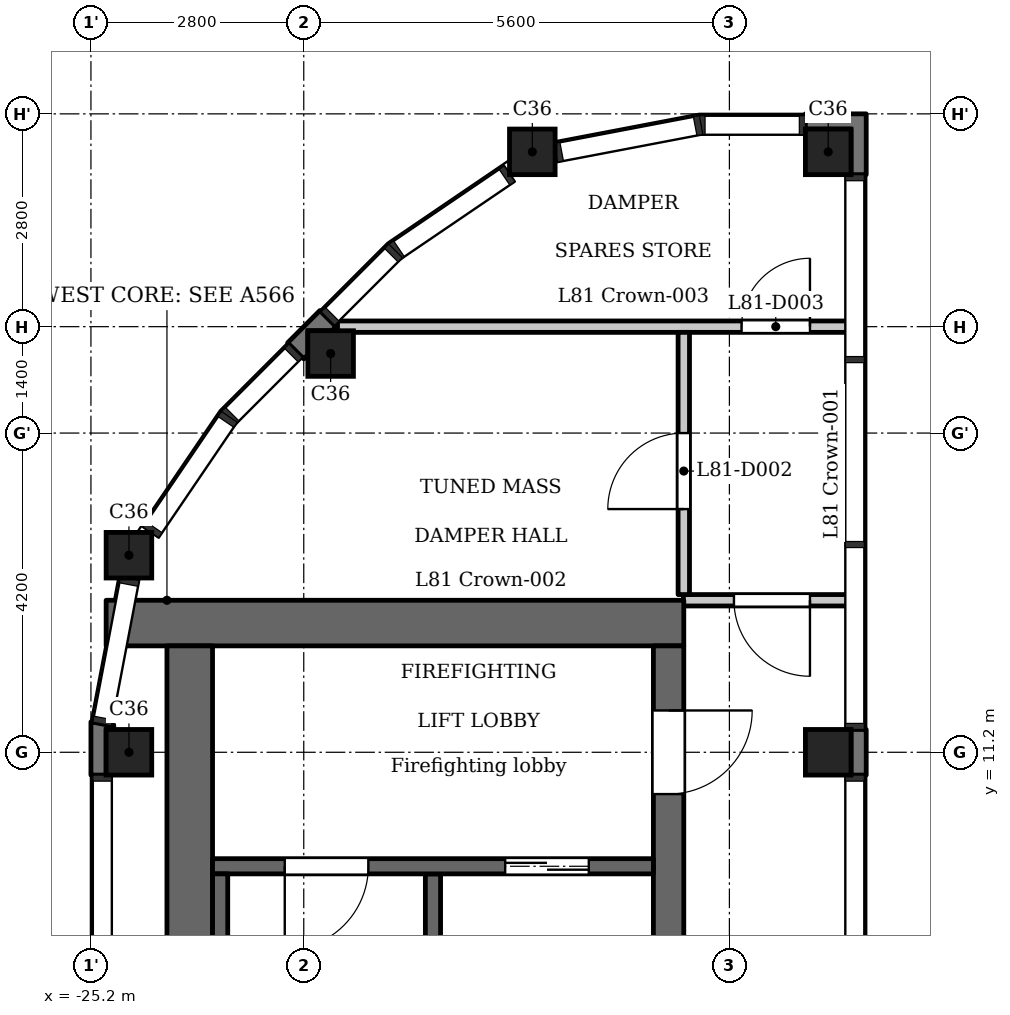
"""IFC4 building model, lengths in metres.
Left out: names, types, materials, properties, quantities, classifications, styles, units other than length and angle.
Written with IfcOpenShell. Run it as: python <this file> out.ifc"""

import sys

from ifc_helpers import new_model, si_unit, direction, frame, frame_2d, origin, origin_2d, place, context, subcontext, project, spatial, polyline, rectangle, outline, extrude, element, fill, save


model = new_model("IFC4")
c1 = context("Model", 3, precision=1e-05, world=origin(), true_north=direction((0.0, 1.0)))
c2 = subcontext(c1, "Body", "Model", "MODEL_VIEW")
j1 = project(units=[si_unit("LENGTHUNIT", "METRE"), si_unit("PLANEANGLEUNIT", "RADIAN")], contexts=[c1])
p1 = place(None, origin())
s1 = spatial("IfcSite", under=j1, at=p1, CompositionType="ELEMENT")
p2 = place(p1, origin())
s2 = spatial("IfcBuilding", under=s1, at=p2, CompositionType="ELEMENT")
p3 = place(p2, frame((0.0, 0.0, 313.9)))
s3 = spatial("IfcBuildingStorey", under=s2, at=p3, CompositionType="ELEMENT", Elevation=313.9)
for number, where, z_axis, x_axis in (
    (1, (-24.7, 11.2, 0.0), (0.0, 0.0, 1.0), (1.0, 0.0, 0.0)),
    (2, (-24.7, 13.793, 0.0), (0.0, 0.0, 1.0), (1.0, 0.0, 0.0)),
    (3, (-22.046, 16.446, 0.0), (0.0, 0.0, 1.0), (1.0, 0.0, 0.0)),
    (4, (-19.393, 19.1, 0.0), (0.0, 0.0, 1.0), (1.0, 0.0, 0.0)),
    (5, (-15.5, 11.2, 0.0), (0.0, 0.0, 1.0), (1.0, 0.0, 0.0)),
    (6, (-15.5, 19.1, 0.0), (0.0, 0.0, 1.0), (1.0, 0.0, 0.0)),
):
    element("IfcColumn", number, at=place(p3, frame(where, z_axis=z_axis, x_axis=x_axis)), inside=s3, PredefinedType="COLUMN", context=c2, shape_type="SweptSolid", body=[
        extrude(rectangle(XDim=0.6, YDim=0.6, at=origin_2d()), origin(), (0.0, 0.0, 1.0), 3.5),
    ])
p4 = place(p3, frame((-20.7, 2.6, 0.0), z_axis=(0.0, 0.0, 1.0), x_axis=(0.0, 1.0, 0.0)))
e7 = element("IfcWall", 7, at=p4, inside=s3, PredefinedType="SHEAR", context=c2, shape_type="SweptSolid", body=[
    extrude(rectangle(XDim=7.0, YDim=0.2, at=frame_2d((3.5, 0.0))), origin(), (0.0, 0.0, 1.0), 3.2),
])
p5 = place(p3, frame((-17.4, 12.9, 0.0), z_axis=(0.0, 0.0, 1.0), x_axis=(-1.0, 0.0, 0.0)))
e8 = element("IfcWall", 8, at=p5, inside=s3, PredefinedType="SHEAR", context=c2, shape_type="SweptSolid", body=[
    extrude(rectangle(XDim=7.6, YDim=0.6, at=frame_2d((3.8, 0.0))), origin(), (0.0, 0.0, 1.0), 3.2),
])
p6 = place(p3, frame((-17.6, -12.6, 0.0), z_axis=(0.0, 0.0, 1.0), x_axis=(0.0, 1.0, 0.0)))
e9 = element("IfcWall", 9, at=p6, inside=s3, PredefinedType="SHEAR", context=c2, shape_type="SweptSolid", body=[
    extrude(rectangle(XDim=25.2, YDim=0.4, at=frame_2d((12.6, 0.0))), origin(), (0.0, 0.0, 1.0), 3.2),
])
p7 = place(p6, frame((8.8, 0.0, 0.0)))
e10 = element("IfcOpeningElement", 10, at=p7, cuts=e9, PredefinedType="OPENING", context=c2, shape_type="SweptSolid", body=[
    extrude(rectangle(XDim=0.9, YDim=2.1, at=frame_2d((0.45, 1.05))), frame((0.0, 0.21, 0.0), z_axis=(0.0, -1.0, 0.0), x_axis=(1.0, 0.0, 0.0)), (0.0, 0.0, 1.0), 0.42),
])
p8 = place(p6, frame((17.05, 0.0, 0.0)))
e11 = element("IfcOpeningElement", 11, at=p8, cuts=e9, PredefinedType="OPENING", context=c2, shape_type="SweptSolid", body=[
    extrude(rectangle(XDim=0.9, YDim=2.1, at=frame_2d((0.45, 1.05))), frame((0.0, 0.21, 0.0), z_axis=(0.0, -1.0, 0.0), x_axis=(1.0, 0.0, 0.0)), (0.0, 0.0, 1.0), 0.42),
])
p9 = place(p6, frame((23.25, 0.0, 0.0)))
e12 = element("IfcOpeningElement", 12, at=p9, cuts=e9, PredefinedType="OPENING", context=c2, shape_type="SweptSolid", body=[
    extrude(rectangle(XDim=1.1, YDim=2.1, at=frame_2d((0.55, 1.05))), frame((0.0, 0.21, 0.0), z_axis=(0.0, -1.0, 0.0), x_axis=(1.0, 0.0, 0.0)), (0.0, 0.0, 1.0), 0.42),
])
p10 = place(p6, frame((0.85, 0.0, 0.0)))
e13 = element("IfcOpeningElement", 13, at=p10, cuts=e9, PredefinedType="OPENING", context=c2, shape_type="SweptSolid", body=[
    extrude(rectangle(XDim=1.1, YDim=2.1, at=frame_2d((0.55, 1.05))), frame((0.0, 0.21, 0.0), z_axis=(0.0, -1.0, 0.0), x_axis=(1.0, 0.0, 0.0)), (0.0, 0.0, 1.0), 0.42),
])
p11 = place(p6, frame((13.075, 0.0, 0.0)))
e14 = element("IfcOpeningElement", 14, at=p11, cuts=e9, PredefinedType="OPENING", context=c2, shape_type="SweptSolid", body=[
    extrude(rectangle(XDim=1.8, YDim=2.1, at=frame_2d((0.9, 1.05))), frame((0.0, 0.21, 0.0), z_axis=(0.0, -1.0, 0.0), x_axis=(1.0, 0.0, 0.0)), (0.0, 0.0, 1.0), 0.42),
])
p12 = place(p3, frame((-23.9, -12.6, 0.0), z_axis=(0.0, 0.0, 1.0), x_axis=(0.0, 1.0, 0.0)))
e15 = element("IfcWall", 15, at=p12, inside=s3, PredefinedType="SHEAR", context=c2, shape_type="SweptSolid", body=[
    extrude(rectangle(XDim=25.2, YDim=0.6, at=frame_2d((12.6, 0.0))), origin(), (0.0, 0.0, 1.0), 3.2),
])
p13 = place(p3, frame((-17.8, 9.7, 0.0), z_axis=(0.0, 0.0, 1.0), x_axis=(-1.0, 0.0, 0.0)))
e16 = element("IfcWall", 16, at=p13, inside=s3, PredefinedType="SHEAR", context=c2, shape_type="SweptSolid", body=[
    extrude(rectangle(XDim=5.8, YDim=0.2, at=frame_2d((2.9, 0.0))), origin(), (0.0, 0.0, 1.0), 3.2),
])
p14 = place(p13, frame((0.85, 0.0, 0.0)))
e17 = element("IfcOpeningElement", 17, at=p14, cuts=e16, PredefinedType="OPENING", context=c2, shape_type="SweptSolid", body=[
    extrude(rectangle(XDim=1.1, YDim=2.1, at=frame_2d((0.55, 1.05))), frame((0.0, 0.11, 0.0), z_axis=(0.0, -1.0, 0.0), x_axis=(1.0, 0.0, 0.0)), (0.0, 0.0, 1.0), 0.22),
])
p15 = place(p13, frame((3.75, 0.0, 0.0)))
e18 = element("IfcOpeningElement", 18, at=p15, cuts=e16, PredefinedType="OPENING", context=c2, shape_type="SweptSolid", body=[
    extrude(rectangle(XDim=1.1, YDim=2.1, at=frame_2d((0.55, 1.05))), frame((0.0, 0.11, 0.0), z_axis=(0.0, -1.0, 0.0), x_axis=(1.0, 0.0, 0.0)), (0.0, 0.0, 1.0), 0.22),
])
p16 = place(p3, frame((-23.5, 2.6, 0.0), z_axis=(0.0, 0.0, 1.0), x_axis=(0.0, 1.0, 0.0)))
e19 = element("IfcWall", 19, at=p16, inside=s3, PredefinedType="SHEAR", context=c2, shape_type="SweptSolid", body=[
    extrude(rectangle(XDim=7.0, YDim=0.2, at=frame_2d((3.5, 0.0))), origin(), (0.0, 0.0, 1.0), 3.2),
])
p17 = place(p3, frame((-17.405, 13.2, 0.0), z_axis=(0.0, 0.0, 1.0), x_axis=(1.0, 0.0, 0.0)))
e20 = element("IfcWall", 20, at=p17, inside=s3, PredefinedType="PARTITIONING", context=c2, shape_type="SweptSolid", body=[
    extrude(rectangle(XDim=2.217, YDim=0.15, at=frame_2d((1.108, 0.0))), origin(), (0.0, 0.0, 1.0), 3.2),
])
p18 = place(p17, frame((0.665, 0.0, 0.0)))
e21 = element("IfcOpeningElement", 21, at=p18, cuts=e20, PredefinedType="OPENING", context=c2, shape_type="SweptSolid", body=[
    extrude(rectangle(XDim=1.0, YDim=2.1, at=frame_2d((0.5, 1.05))), frame((0.0, 0.085, 0.0), z_axis=(0.0, -1.0, 0.0), x_axis=(1.0, 0.0, 0.0)), (0.0, 0.0, 1.0), 0.17),
])
p19 = place(p3, frame((-21.956, 16.8, 0.0), z_axis=(0.0, 0.0, 1.0), x_axis=(1.0, 0.0, 0.0)))
e22 = element("IfcWall", 22, at=p19, inside=s3, PredefinedType="PARTITIONING", context=c2, shape_type="SweptSolid", body=[
    extrude(rectangle(XDim=6.768, YDim=0.15, at=frame_2d((3.384, 0.0))), origin(), (0.0, 0.0, 1.0), 3.2),
])
p20 = place(p19, frame((5.316, 0.0, 0.0)))
e23 = element("IfcOpeningElement", 23, at=p20, cuts=e22, PredefinedType="OPENING", context=c2, shape_type="SweptSolid", body=[
    extrude(rectangle(XDim=0.9, YDim=2.1, at=frame_2d((0.45, 1.05))), frame((0.0, 0.085, 0.0), z_axis=(0.0, -1.0, 0.0), x_axis=(1.0, 0.0, 0.0)), (0.0, 0.0, 1.0), 0.17),
])
p21 = place(p3, frame((-17.4, 13.275, 0.0), z_axis=(0.0, 0.0, 1.0), x_axis=(0.0, 1.0, 0.0)))
e24 = element("IfcWall", 24, at=p21, inside=s3, PredefinedType="PARTITIONING", context=c2, shape_type="SweptSolid", body=[
    extrude(rectangle(XDim=3.45, YDim=0.15, at=frame_2d((1.725, 0.0))), origin(), (0.0, 0.0, 1.0), 3.2),
])
p22 = place(p21, frame((1.125, 0.0, 0.0)))
e25 = element("IfcOpeningElement", 25, at=p22, cuts=e24, PredefinedType="OPENING", context=c2, shape_type="SweptSolid", body=[
    extrude(rectangle(XDim=1.0, YDim=2.1, at=frame_2d((0.5, 1.05))), frame((0.0, 0.085, 0.0), z_axis=(0.0, -1.0, 0.0), x_axis=(1.0, 0.0, 0.0)), (0.0, 0.0, 1.0), 0.17),
])
p23 = place(p3, origin())
e26 = element("IfcWall", 26, at=p23, inside=s3, PredefinedType="SOLIDWALL", context=c2, shape_type="SweptSolid", body=[
    extrude(outline(polyline([(-25.2, 11.601), (-25.2, 10.9), (-25.0, 10.9), (-25.0, 11.5), (-24.9, 11.5), (-24.9, 11.561), (-24.903, 11.544), (-25.2, 11.601)])), origin(), (0.0, 0.0, 1.0), 3.2),
])
e27 = element("IfcWall", 27, at=p23, inside=s3, PredefinedType="SOLIDWALL", context=c2, shape_type="SweptSolid", body=[
    extrude(outline(polyline([(-21.976, 16.8), (-22.188, 17.012), (-22.612, 16.588), (-22.4, 16.376), (-22.346, 16.429), (-22.346, 16.746), (-22.029, 16.746), (-21.976, 16.8)])), origin(), (0.0, 0.0, 1.0), 3.2),
])
e28 = element("IfcWall", 28, at=p23, inside=s3, PredefinedType="SOLIDWALL", context=c2, shape_type="SweptSolid", body=[
    extrude(outline(polyline([(-15.0, 18.8), (-15.0, 19.6), (-15.8, 19.6), (-15.8, 19.4), (-15.2, 19.4), (-15.2, 18.8), (-15.0, 18.8)])), origin(), (0.0, 0.0, 1.0), 3.2),
])
e29 = element("IfcWall", 29, at=p23, inside=s3, PredefinedType="SOLIDWALL", context=c2, shape_type="SweptSolid", body=[
    extrude(outline(polyline([(-15.2, 10.9), (-15.0, 10.9), (-15.0, 11.5), (-15.2, 11.5), (-15.2, 10.9)])), origin(), (0.0, 0.0, 1.0), 3.2),
])
p24 = place(p14, origin())
e30 = element("IfcDoor", 30, at=p24, inside=s3, OperationType="DOUBLE_DOOR_SLIDING", PredefinedType="DOOR", context=c2, shape_type="SweptSolid", body=[
    extrude(rectangle(XDim=1.1, YDim=2.1, at=frame_2d((0.55, 1.05))), frame((0.0, 0.025, 0.0), z_axis=(0.0, -1.0, 0.0), x_axis=(1.0, 0.0, 0.0)), (0.0, 0.0, 1.0), 0.05),
])
fill(e17, e30)
p25 = place(p9, origin())
e31 = element("IfcDoor", 31, at=p25, inside=s3, OperationType="SINGLE_SWING_RIGHT", PredefinedType="DOOR", context=c2, shape_type="SweptSolid", body=[
    extrude(rectangle(XDim=1.1, YDim=2.1, at=frame_2d((0.55, 1.05))), frame((0.0, 0.025, 0.0), z_axis=(0.0, -1.0, 0.0), x_axis=(1.0, 0.0, 0.0)), (0.0, 0.0, 1.0), 0.05),
])
fill(e12, e31)
p26 = place(p15, origin())
e32 = element("IfcDoor", 32, at=p26, inside=s3, OperationType="SINGLE_SWING_LEFT", PredefinedType="DOOR", context=c2, shape_type="SweptSolid", body=[
    extrude(rectangle(XDim=1.1, YDim=2.1, at=frame_2d((0.55, 1.05))), frame((0.0, 0.025, 0.0), z_axis=(0.0, -1.0, 0.0), x_axis=(1.0, 0.0, 0.0)), (0.0, 0.0, 1.0), 0.05),
])
fill(e18, e32)
p27 = place(p18, origin())
e33 = element("IfcDoor", 33, at=p27, inside=s3, OperationType="SINGLE_SWING_RIGHT", PredefinedType="DOOR", context=c2, shape_type="SweptSolid", body=[
    extrude(rectangle(XDim=1.0, YDim=2.1, at=frame_2d((0.5, 1.05))), frame((0.0, 0.025, 0.0), z_axis=(0.0, -1.0, 0.0), x_axis=(1.0, 0.0, 0.0)), (0.0, 0.0, 1.0), 0.05),
])
fill(e21, e33)
p28 = place(p22, origin())
e34 = element("IfcDoor", 34, at=p28, inside=s3, OperationType="SINGLE_SWING_RIGHT", PredefinedType="DOOR", context=c2, shape_type="SweptSolid", body=[
    extrude(rectangle(XDim=1.0, YDim=2.1, at=frame_2d((0.5, 1.05))), frame((0.0, 0.025, 0.0), z_axis=(0.0, -1.0, 0.0), x_axis=(1.0, 0.0, 0.0)), (0.0, 0.0, 1.0), 0.05),
])
fill(e25, e34)
p29 = place(p20, origin())
e35 = element("IfcDoor", 35, at=p29, inside=s3, OperationType="SINGLE_SWING_LEFT", PredefinedType="DOOR", context=c2, shape_type="SweptSolid", body=[
    extrude(rectangle(XDim=0.9, YDim=2.1, at=frame_2d((0.45, 1.05))), frame((0.0, 0.025, 0.0), z_axis=(0.0, -1.0, 0.0), x_axis=(1.0, 0.0, 0.0)), (0.0, 0.0, 1.0), 0.05),
])
fill(e23, e35)
save(model, sys.argv[1])
